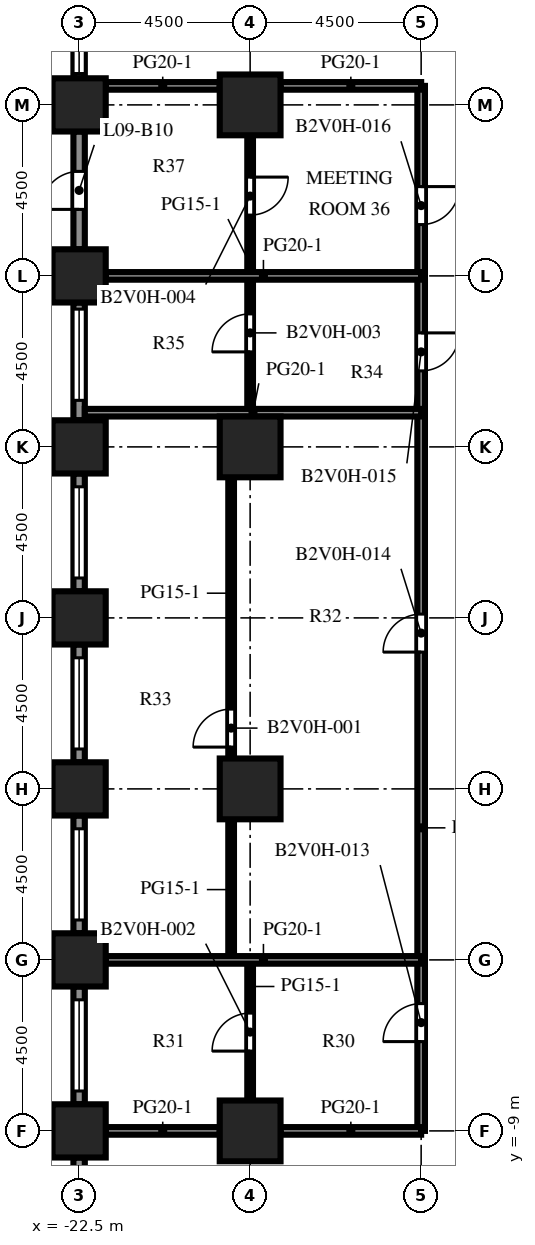
"""IFC4 building model, lengths in metres.
Left out: names, types, materials, properties, quantities, classifications, styles, units other than length and angle.
Written with IfcOpenShell. Run it as: python <this file> out.ifc"""

import sys

from ifc_helpers import new_model, si_unit, direction, frame, frame_2d, origin, origin_2d, place, context, subcontext, project, spatial, rectangle, extrude, element, fill, save


model = new_model("IFC4")
c1 = context("Model", 3, precision=1e-05, world=origin(), true_north=direction((0.0, 1.0)))
c2 = subcontext(c1, "Body", "Model", "MODEL_VIEW")
j1 = project(units=[si_unit("LENGTHUNIT", "METRE"), si_unit("PLANEANGLEUNIT", "RADIAN")], contexts=[c1])
p1 = place(None, origin())
s1 = spatial("IfcSite", under=j1, at=p1, CompositionType="ELEMENT")
p2 = place(p1, origin())
s2 = spatial("IfcBuilding", under=s1, at=p2, CompositionType="ELEMENT")
p3 = place(p2, frame((0.0, 0.0, 41.9)))
s3 = spatial("IfcBuildingStorey", under=s2, at=p3, CompositionType="ELEMENT", Elevation=41.9)
for number, where, z_axis, x_axis in (
    (1, (-22.5, -9.0, -0.45), (0.0, 0.0, 1.0), (1.0, 0.0, 0.0)),
    (2, (-22.5, -4.5, -0.45), (0.0, 0.0, 1.0), (1.0, 0.0, 0.0)),
    (3, (-22.5, 0.0, -0.45), (0.0, 0.0, 1.0), (1.0, 0.0, 0.0)),
    (4, (-22.5, 4.5, -0.45), (0.0, 0.0, 1.0), (1.0, 0.0, 0.0)),
    (5, (-22.5, 9.0, -0.45), (0.0, 0.0, 1.0), (1.0, 0.0, 0.0)),
    (6, (-22.5, 13.5, -0.45), (0.0, 0.0, 1.0), (1.0, 0.0, 0.0)),
    (7, (-22.5, 18.0, -0.45), (0.0, 0.0, 1.0), (1.0, 0.0, 0.0)),
):
    element("IfcColumn", number, at=place(p3, frame(where, z_axis=z_axis, x_axis=x_axis)), inside=s3, PredefinedType="COLUMN", context=c2, shape_type="SweptSolid", body=[
        extrude(rectangle(XDim=1.4, YDim=1.4, at=origin_2d()), origin(), (0.0, 0.0, 1.0), 4.55),
    ])
for number, where, z_axis, x_axis in (
    (8, (-18.0, -9.0, -0.45), (0.0, 0.0, 1.0), (1.0, 0.0, 0.0)),
    (9, (-18.0, 0.0, -0.45), (0.0, 0.0, 1.0), (1.0, 0.0, 0.0)),
    (10, (-18.0, 9.0, -0.45), (0.0, 0.0, 1.0), (1.0, 0.0, 0.0)),
    (11, (-18.0, 18.0, -0.45), (0.0, 0.0, 1.0), (1.0, 0.0, 0.0)),
):
    element("IfcColumn", number, at=place(p3, frame(where, z_axis=z_axis, x_axis=x_axis)), inside=s3, PredefinedType="COLUMN", context=c2, shape_type="SweptSolid", body=[
        extrude(rectangle(XDim=1.6, YDim=1.6, at=origin_2d()), origin(), (0.0, 0.0, 1.0), 4.55),
    ])
p4 = place(p3, frame((-22.5, 18.7, 0.0), z_axis=(0.0, 0.0, 1.0), x_axis=(0.0, 1.0, 0.0)))
e12 = element("IfcWall", 12, at=p4, inside=s3, PredefinedType="SOLIDWALL", context=c2, shape_type="SweptSolid", body=[
    extrude(rectangle(XDim=3.1, YDim=0.3, at=frame_2d((1.55, 0.0))), origin(), (0.0, 0.0, 1.0), 2.75),
])
p5 = place(p4, frame((0.125, 0.0, 0.8)))
e13 = element("IfcOpeningElement", 13, at=p5, cuts=e12, PredefinedType="OPENING", context=c2, shape_type="SweptSolid", body=[
    extrude(rectangle(XDim=2.4, YDim=1.7, at=frame_2d((1.2, 0.85))), frame((0.0, 0.16, 0.0), z_axis=(0.0, -1.0, 0.0), x_axis=(1.0, 0.0, 0.0)), (0.0, 0.0, 1.0), 0.32),
])
p6 = place(p3, frame((-22.5, 14.2, 0.0), z_axis=(0.0, 0.0, 1.0), x_axis=(0.0, 1.0, 0.0)))
e14 = element("IfcWall", 14, at=p6, inside=s3, PredefinedType="SOLIDWALL", context=c2, shape_type="SweptSolid", body=[
    extrude(rectangle(XDim=3.1, YDim=0.3, at=frame_2d((1.55, 0.0))), origin(), (0.0, 0.0, 1.0), 2.75),
])
p7 = place(p6, frame((1.05, 0.0, 0.0)))
e15 = element("IfcOpeningElement", 15, at=p7, cuts=e14, PredefinedType="OPENING", context=c2, shape_type="SweptSolid", body=[
    extrude(rectangle(XDim=1.0, YDim=2.2, at=frame_2d((0.5, 1.1))), frame((0.0, 0.16, 0.0), z_axis=(0.0, -1.0, 0.0), x_axis=(1.0, 0.0, 0.0)), (0.0, 0.0, 1.0), 0.32),
])
p8 = place(p3, frame((-22.5, 9.7, 0.0), z_axis=(0.0, 0.0, 1.0), x_axis=(0.0, 1.0, 0.0)))
e16 = element("IfcWall", 16, at=p8, inside=s3, PredefinedType="SOLIDWALL", context=c2, shape_type="SweptSolid", body=[
    extrude(rectangle(XDim=3.1, YDim=0.3, at=frame_2d((1.55, 0.0))), origin(), (0.0, 0.0, 1.0), 2.75),
])
p9 = place(p8, frame((0.525, 0.0, 0.8)))
e17 = element("IfcOpeningElement", 17, at=p9, cuts=e16, PredefinedType="OPENING", context=c2, shape_type="SweptSolid", body=[
    extrude(rectangle(XDim=2.4, YDim=1.7, at=frame_2d((1.2, 0.85))), frame((0.0, 0.16, 0.0), z_axis=(0.0, -1.0, 0.0), x_axis=(1.0, 0.0, 0.0)), (0.0, 0.0, 1.0), 0.32),
])
p10 = place(p3, frame((-22.5, 5.2, 0.0), z_axis=(0.0, 0.0, 1.0), x_axis=(0.0, 1.0, 0.0)))
e18 = element("IfcWall", 18, at=p10, inside=s3, PredefinedType="SOLIDWALL", context=c2, shape_type="SweptSolid", body=[
    extrude(rectangle(XDim=3.1, YDim=0.3, at=frame_2d((1.55, 0.0))), origin(), (0.0, 0.0, 1.0), 2.75),
])
p11 = place(p10, frame((0.35, 0.0, 0.8)))
e19 = element("IfcOpeningElement", 19, at=p11, cuts=e18, PredefinedType="OPENING", context=c2, shape_type="SweptSolid", body=[
    extrude(rectangle(XDim=2.4, YDim=1.7, at=frame_2d((1.2, 0.85))), frame((0.0, 0.16, 0.0), z_axis=(0.0, -1.0, 0.0), x_axis=(1.0, 0.0, 0.0)), (0.0, 0.0, 1.0), 0.32),
])
p12 = place(p3, frame((-22.5, 0.7, 0.0), z_axis=(0.0, 0.0, 1.0), x_axis=(0.0, 1.0, 0.0)))
e20 = element("IfcWall", 20, at=p12, inside=s3, PredefinedType="SOLIDWALL", context=c2, shape_type="SweptSolid", body=[
    extrude(rectangle(XDim=3.1, YDim=0.3, at=frame_2d((1.55, 0.0))), origin(), (0.0, 0.0, 1.0), 2.75),
])
p13 = place(p12, frame((0.35, 0.0, 0.8)))
e21 = element("IfcOpeningElement", 21, at=p13, cuts=e20, PredefinedType="OPENING", context=c2, shape_type="SweptSolid", body=[
    extrude(rectangle(XDim=2.4, YDim=1.7, at=frame_2d((1.2, 0.85))), frame((0.0, 0.16, 0.0), z_axis=(0.0, -1.0, 0.0), x_axis=(1.0, 0.0, 0.0)), (0.0, 0.0, 1.0), 0.32),
])
p14 = place(p3, frame((-22.5, -3.8, 0.0), z_axis=(0.0, 0.0, 1.0), x_axis=(0.0, 1.0, 0.0)))
e22 = element("IfcWall", 22, at=p14, inside=s3, PredefinedType="SOLIDWALL", context=c2, shape_type="SweptSolid", body=[
    extrude(rectangle(XDim=3.1, YDim=0.3, at=frame_2d((1.55, 0.0))), origin(), (0.0, 0.0, 1.0), 2.75),
])
p15 = place(p14, frame((0.35, 0.0, 0.8)))
e23 = element("IfcOpeningElement", 23, at=p15, cuts=e22, PredefinedType="OPENING", context=c2, shape_type="SweptSolid", body=[
    extrude(rectangle(XDim=2.4, YDim=1.7, at=frame_2d((1.2, 0.85))), frame((0.0, 0.16, 0.0), z_axis=(0.0, -1.0, 0.0), x_axis=(1.0, 0.0, 0.0)), (0.0, 0.0, 1.0), 0.32),
])
p16 = place(p3, frame((-22.5, -8.3, 0.0), z_axis=(0.0, 0.0, 1.0), x_axis=(0.0, 1.0, 0.0)))
e24 = element("IfcWall", 24, at=p16, inside=s3, PredefinedType="SOLIDWALL", context=c2, shape_type="SweptSolid", body=[
    extrude(rectangle(XDim=3.1, YDim=0.3, at=frame_2d((1.55, 0.0))), origin(), (0.0, 0.0, 1.0), 2.75),
])
p17 = place(p16, frame((0.35, 0.0, 0.8)))
e25 = element("IfcOpeningElement", 25, at=p17, cuts=e24, PredefinedType="OPENING", context=c2, shape_type="SweptSolid", body=[
    extrude(rectangle(XDim=2.4, YDim=1.7, at=frame_2d((1.2, 0.85))), frame((0.0, 0.16, 0.0), z_axis=(0.0, -1.0, 0.0), x_axis=(1.0, 0.0, 0.0)), (0.0, 0.0, 1.0), 0.32),
])
p18 = place(p3, frame((-22.5, -12.8, 0.0), z_axis=(0.0, 0.0, 1.0), x_axis=(0.0, 1.0, 0.0)))
e26 = element("IfcWall", 26, at=p18, inside=s3, PredefinedType="SOLIDWALL", context=c2, shape_type="SweptSolid", body=[
    extrude(rectangle(XDim=3.1, YDim=0.3, at=frame_2d((1.55, 0.0))), origin(), (0.0, 0.0, 1.0), 2.75),
])
p19 = place(p18, frame((1.425, 0.0, 0.8)))
e27 = element("IfcOpeningElement", 27, at=p19, cuts=e26, PredefinedType="OPENING", context=c2, shape_type="SweptSolid", body=[
    extrude(rectangle(XDim=1.2, YDim=1.7, at=frame_2d((0.6, 0.85))), frame((0.0, 0.16, 0.0), z_axis=(0.0, -1.0, 0.0), x_axis=(1.0, 0.0, 0.0)), (0.0, 0.0, 1.0), 0.32),
])
p20 = place(p3, frame((-18.5, -4.5, 0.0), z_axis=(0.0, 0.0, 1.0), x_axis=(0.0, 1.0, 0.0)))
e28 = element("IfcWall", 28, at=p20, inside=s3, PredefinedType="PARTITIONING", context=c2, shape_type="SweptSolid", body=[
    extrude(rectangle(XDim=3.7, YDim=0.15, at=frame_2d((1.85, 0.0))), origin(), (0.0, 0.0, 1.0), 3.65),
])
p21 = place(p3, frame((-18.5, 0.8, 0.0), z_axis=(0.0, 0.0, 1.0), x_axis=(0.0, 1.0, 0.0)))
e29 = element("IfcWall", 29, at=p21, inside=s3, PredefinedType="PARTITIONING", context=c2, shape_type="SweptSolid", body=[
    extrude(rectangle(XDim=7.4, YDim=0.15, at=frame_2d((3.7, 0.0))), origin(), (0.0, 0.0, 1.0), 3.65),
])
p22 = place(p21, frame((0.3, 0.0, 0.0)))
e30 = element("IfcOpeningElement", 30, at=p22, cuts=e29, PredefinedType="OPENING", context=c2, shape_type="SweptSolid", body=[
    extrude(rectangle(XDim=1.0, YDim=2.1, at=frame_2d((0.5, 1.05))), frame((0.0, 0.085, 0.0), z_axis=(0.0, -1.0, 0.0), x_axis=(1.0, 0.0, 0.0)), (0.0, 0.0, 1.0), 0.17),
])
p23 = place(p3, frame((-18.0, -8.2, 0.0), z_axis=(0.0, 0.0, 1.0), x_axis=(0.0, 1.0, 0.0)))
e31 = element("IfcWall", 31, at=p23, inside=s3, PredefinedType="PARTITIONING", context=c2, shape_type="SweptSolid", body=[
    extrude(rectangle(XDim=3.7, YDim=0.15, at=frame_2d((1.85, 0.0))), origin(), (0.0, 0.0, 1.0), 3.65),
])
p24 = place(p23, frame((1.3, 0.0, 0.0)))
e32 = element("IfcOpeningElement", 32, at=p24, cuts=e31, PredefinedType="OPENING", context=c2, shape_type="SweptSolid", body=[
    extrude(rectangle(XDim=1.0, YDim=2.1, at=frame_2d((0.5, 1.05))), frame((0.0, 0.085, 0.0), z_axis=(0.0, -1.0, 0.0), x_axis=(1.0, 0.0, 0.0)), (0.0, 0.0, 1.0), 0.17),
])
p25 = place(p3, frame((-18.0, 9.9, 0.0), z_axis=(0.0, 0.0, 1.0), x_axis=(0.0, 1.0, 0.0)))
e33 = element("IfcWall", 33, at=p25, inside=s3, PredefinedType="PARTITIONING", context=c2, shape_type="SweptSolid", body=[
    extrude(rectangle(XDim=7.3, YDim=0.15, at=frame_2d((3.65, 0.0))), origin(), (0.0, 0.0, 1.0), 3.65),
])
p26 = place(p25, frame((1.6, 0.0, 0.0)))
e34 = element("IfcOpeningElement", 34, at=p26, cuts=e33, PredefinedType="OPENING", context=c2, shape_type="SweptSolid", body=[
    extrude(rectangle(XDim=1.0, YDim=2.1, at=frame_2d((0.5, 1.05))), frame((0.0, 0.085, 0.0), z_axis=(0.0, -1.0, 0.0), x_axis=(1.0, 0.0, 0.0)), (0.0, 0.0, 1.0), 0.17),
])
p27 = place(p25, frame((5.2, 0.0, 0.0)))
e35 = element("IfcOpeningElement", 35, at=p27, cuts=e33, PredefinedType="OPENING", context=c2, shape_type="SweptSolid", body=[
    extrude(rectangle(XDim=1.0, YDim=2.1, at=frame_2d((0.5, 1.05))), frame((0.0, 0.085, 0.0), z_axis=(0.0, -1.0, 0.0), x_axis=(1.0, 0.0, 0.0)), (0.0, 0.0, 1.0), 0.17),
])
p28 = place(p3, frame((-13.5, -9.0, 0.0), z_axis=(0.0, 0.0, 1.0), x_axis=(0.0, 1.0, 0.0)))
e36 = element("IfcWall", 36, at=p28, inside=s3, PredefinedType="PARTITIONING", context=c2, shape_type="SweptSolid", body=[
    extrude(rectangle(XDim=27.5, YDim=0.2, at=frame_2d((13.75, 0.0))), origin(), (0.0, 0.0, 1.0), 3.65),
])
p29 = place(p28, frame((2.35, 0.0, 0.0)))
e37 = element("IfcOpeningElement", 37, at=p29, cuts=e36, PredefinedType="OPENING", context=c2, shape_type="SweptSolid", body=[
    extrude(rectangle(XDim=1.0, YDim=2.1, at=frame_2d((0.5, 1.05))), frame((0.0, 0.11, 0.0), z_axis=(0.0, -1.0, 0.0), x_axis=(1.0, 0.0, 0.0)), (0.0, 0.0, 1.0), 0.22),
])
p30 = place(p28, frame((12.6, 0.0, 0.0)))
e38 = element("IfcOpeningElement", 38, at=p30, cuts=e36, PredefinedType="OPENING", context=c2, shape_type="SweptSolid", body=[
    extrude(rectangle(XDim=1.0, YDim=2.1, at=frame_2d((0.5, 1.05))), frame((0.0, 0.11, 0.0), z_axis=(0.0, -1.0, 0.0), x_axis=(1.0, 0.0, 0.0)), (0.0, 0.0, 1.0), 0.22),
])
p31 = place(p28, frame((20.0, 0.0, 0.0)))
e39 = element("IfcOpeningElement", 39, at=p31, cuts=e36, PredefinedType="OPENING", context=c2, shape_type="SweptSolid", body=[
    extrude(rectangle(XDim=1.0, YDim=2.1, at=frame_2d((0.5, 1.05))), frame((0.0, 0.11, 0.0), z_axis=(0.0, -1.0, 0.0), x_axis=(1.0, 0.0, 0.0)), (0.0, 0.0, 1.0), 0.22),
])
p32 = place(p28, frame((23.85, 0.0, 0.0)))
e40 = element("IfcOpeningElement", 40, at=p32, cuts=e36, PredefinedType="OPENING", context=c2, shape_type="SweptSolid", body=[
    extrude(rectangle(XDim=1.0, YDim=2.1, at=frame_2d((0.5, 1.05))), frame((0.0, 0.11, 0.0), z_axis=(0.0, -1.0, 0.0), x_axis=(1.0, 0.0, 0.0)), (0.0, 0.0, 1.0), 0.22),
])
p33 = place(p3, frame((-21.8, -9.0, 0.0), z_axis=(0.0, 0.0, 1.0), x_axis=(1.0, 0.0, 0.0)))
e41 = element("IfcWall", 41, at=p33, inside=s3, PredefinedType="PARTITIONING", context=c2, shape_type="SweptSolid", body=[
    extrude(rectangle(XDim=3.0, YDim=0.2, at=frame_2d((1.5, 0.0))), origin(), (0.0, 0.0, 1.0), 3.65),
])
p34 = place(p3, frame((-17.2, -9.0, 0.0), z_axis=(0.0, 0.0, 1.0), x_axis=(1.0, 0.0, 0.0)))
e42 = element("IfcWall", 42, at=p34, inside=s3, PredefinedType="PARTITIONING", context=c2, shape_type="SweptSolid", body=[
    extrude(rectangle(XDim=3.7, YDim=0.2, at=frame_2d((1.85, 0.0))), origin(), (0.0, 0.0, 1.0), 3.65),
])
p35 = place(p3, frame((-21.8, -4.5, 0.0), z_axis=(0.0, 0.0, 1.0), x_axis=(1.0, 0.0, 0.0)))
e43 = element("IfcWall", 43, at=p35, inside=s3, PredefinedType="PARTITIONING", context=c2, shape_type="SweptSolid", body=[
    extrude(rectangle(XDim=8.3, YDim=0.2, at=frame_2d((4.15, 0.0))), origin(), (0.0, 0.0, 1.0), 3.65),
])
p36 = place(p3, frame((-22.35, 9.9, 0.0), z_axis=(0.0, 0.0, 1.0), x_axis=(1.0, 0.0, 0.0)))
e44 = element("IfcWall", 44, at=p36, inside=s3, PredefinedType="PARTITIONING", context=c2, shape_type="SweptSolid", body=[
    extrude(rectangle(XDim=8.85, YDim=0.2, at=frame_2d((4.425, 0.0))), origin(), (0.0, 0.0, 1.0), 3.65),
])
p37 = place(p3, frame((-21.8, 13.5, 0.0), z_axis=(0.0, 0.0, 1.0), x_axis=(1.0, 0.0, 0.0)))
e45 = element("IfcWall", 45, at=p37, inside=s3, PredefinedType="PARTITIONING", context=c2, shape_type="SweptSolid", body=[
    extrude(rectangle(XDim=8.3, YDim=0.2, at=frame_2d((4.15, 0.0))), origin(), (0.0, 0.0, 1.0), 3.65),
])
p38 = place(p3, frame((-21.8, 18.5, 0.0), z_axis=(0.0, 0.0, 1.0), x_axis=(1.0, 0.0, 0.0)))
e46 = element("IfcWall", 46, at=p38, inside=s3, PredefinedType="PARTITIONING", context=c2, shape_type="SweptSolid", body=[
    extrude(rectangle(XDim=3.0, YDim=0.2, at=frame_2d((1.5, 0.0))), origin(), (0.0, 0.0, 1.0), 3.65),
])
p39 = place(p3, frame((-17.2, 18.5, 0.0), z_axis=(0.0, 0.0, 1.0), x_axis=(1.0, 0.0, 0.0)))
e47 = element("IfcWall", 47, at=p39, inside=s3, PredefinedType="PARTITIONING", context=c2, shape_type="SweptSolid", body=[
    extrude(rectangle(XDim=3.7, YDim=0.2, at=frame_2d((1.85, 0.0))), origin(), (0.0, 0.0, 1.0), 3.65),
])
p40 = place(p5, origin())
e48 = element("IfcWindow", 48, at=p40, inside=s3, PartitioningType="SINGLE_PANEL", PredefinedType="WINDOW", context=c2, shape_type="SweptSolid", body=[
    extrude(rectangle(XDim=2.4, YDim=1.7, at=frame_2d((1.2, 0.85))), frame((0.0, 0.03, 0.0), z_axis=(0.0, -1.0, 0.0), x_axis=(1.0, 0.0, 0.0)), (0.0, 0.0, 1.0), 0.06),
])
fill(e13, e48)
p41 = place(p7, origin())
e49 = element("IfcDoor", 49, at=p41, inside=s3, OperationType="SINGLE_SWING_LEFT", PredefinedType="DOOR", context=c2, shape_type="SweptSolid", body=[
    extrude(rectangle(XDim=1.0, YDim=2.2, at=frame_2d((0.5, 1.1))), frame((0.0, 0.025, 0.0), z_axis=(0.0, -1.0, 0.0), x_axis=(1.0, 0.0, 0.0)), (0.0, 0.0, 1.0), 0.05),
])
fill(e15, e49)
p42 = place(p9, origin())
e50 = element("IfcWindow", 50, at=p42, inside=s3, PartitioningType="SINGLE_PANEL", PredefinedType="WINDOW", context=c2, shape_type="SweptSolid", body=[
    extrude(rectangle(XDim=2.4, YDim=1.7, at=frame_2d((1.2, 0.85))), frame((0.0, 0.03, 0.0), z_axis=(0.0, -1.0, 0.0), x_axis=(1.0, 0.0, 0.0)), (0.0, 0.0, 1.0), 0.06),
])
fill(e17, e50)
p43 = place(p11, origin())
e51 = element("IfcWindow", 51, at=p43, inside=s3, PartitioningType="SINGLE_PANEL", PredefinedType="WINDOW", context=c2, shape_type="SweptSolid", body=[
    extrude(rectangle(XDim=2.4, YDim=1.7, at=frame_2d((1.2, 0.85))), frame((0.0, 0.03, 0.0), z_axis=(0.0, -1.0, 0.0), x_axis=(1.0, 0.0, 0.0)), (0.0, 0.0, 1.0), 0.06),
])
fill(e19, e51)
p44 = place(p13, origin())
e52 = element("IfcWindow", 52, at=p44, inside=s3, PartitioningType="SINGLE_PANEL", PredefinedType="WINDOW", context=c2, shape_type="SweptSolid", body=[
    extrude(rectangle(XDim=2.4, YDim=1.7, at=frame_2d((1.2, 0.85))), frame((0.0, 0.03, 0.0), z_axis=(0.0, -1.0, 0.0), x_axis=(1.0, 0.0, 0.0)), (0.0, 0.0, 1.0), 0.06),
])
fill(e21, e52)
p45 = place(p15, origin())
e53 = element("IfcWindow", 53, at=p45, inside=s3, PartitioningType="SINGLE_PANEL", PredefinedType="WINDOW", context=c2, shape_type="SweptSolid", body=[
    extrude(rectangle(XDim=2.4, YDim=1.7, at=frame_2d((1.2, 0.85))), frame((0.0, 0.03, 0.0), z_axis=(0.0, -1.0, 0.0), x_axis=(1.0, 0.0, 0.0)), (0.0, 0.0, 1.0), 0.06),
])
fill(e23, e53)
p46 = place(p17, origin())
e54 = element("IfcWindow", 54, at=p46, inside=s3, PartitioningType="SINGLE_PANEL", PredefinedType="WINDOW", context=c2, shape_type="SweptSolid", body=[
    extrude(rectangle(XDim=2.4, YDim=1.7, at=frame_2d((1.2, 0.85))), frame((0.0, 0.03, 0.0), z_axis=(0.0, -1.0, 0.0), x_axis=(1.0, 0.0, 0.0)), (0.0, 0.0, 1.0), 0.06),
])
fill(e25, e54)
p47 = place(p22, origin())
e55 = element("IfcDoor", 55, at=p47, inside=s3, OperationType="SINGLE_SWING_LEFT", PredefinedType="DOOR", context=c2, shape_type="SweptSolid", body=[
    extrude(rectangle(XDim=1.0, YDim=2.1, at=frame_2d((0.5, 1.05))), frame((0.0, 0.025, 0.0), z_axis=(0.0, -1.0, 0.0), x_axis=(1.0, 0.0, 0.0)), (0.0, 0.0, 1.0), 0.05),
])
fill(e30, e55)
p48 = place(p24, origin())
e56 = element("IfcDoor", 56, at=p48, inside=s3, OperationType="SINGLE_SWING_LEFT", PredefinedType="DOOR", context=c2, shape_type="SweptSolid", body=[
    extrude(rectangle(XDim=1.0, YDim=2.1, at=frame_2d((0.5, 1.05))), frame((0.0, 0.025, 0.0), z_axis=(0.0, -1.0, 0.0), x_axis=(1.0, 0.0, 0.0)), (0.0, 0.0, 1.0), 0.05),
])
fill(e32, e56)
p49 = place(p26, origin())
e57 = element("IfcDoor", 57, at=p49, inside=s3, OperationType="SINGLE_SWING_LEFT", PredefinedType="DOOR", context=c2, shape_type="SweptSolid", body=[
    extrude(rectangle(XDim=1.0, YDim=2.1, at=frame_2d((0.5, 1.05))), frame((0.0, 0.025, 0.0), z_axis=(0.0, -1.0, 0.0), x_axis=(1.0, 0.0, 0.0)), (0.0, 0.0, 1.0), 0.05),
])
fill(e34, e57)
p50 = place(p27, origin())
e58 = element("IfcDoor", 58, at=p50, inside=s3, OperationType="SINGLE_SWING_RIGHT", PredefinedType="DOOR", context=c2, shape_type="SweptSolid", body=[
    extrude(rectangle(XDim=1.0, YDim=2.1, at=frame_2d((0.5, 1.05))), frame((0.0, 0.025, 0.0), z_axis=(0.0, -1.0, 0.0), x_axis=(1.0, 0.0, 0.0)), (0.0, 0.0, 1.0), 0.05),
])
fill(e35, e58)
p51 = place(p29, origin())
e59 = element("IfcDoor", 59, at=p51, inside=s3, OperationType="SINGLE_SWING_LEFT", PredefinedType="DOOR", context=c2, shape_type="SweptSolid", body=[
    extrude(rectangle(XDim=1.0, YDim=2.1, at=frame_2d((0.5, 1.05))), frame((0.0, 0.025, 0.0), z_axis=(0.0, -1.0, 0.0), x_axis=(1.0, 0.0, 0.0)), (0.0, 0.0, 1.0), 0.05),
])
fill(e37, e59)
p52 = place(p30, origin())
e60 = element("IfcDoor", 60, at=p52, inside=s3, OperationType="SINGLE_SWING_LEFT", PredefinedType="DOOR", context=c2, shape_type="SweptSolid", body=[
    extrude(rectangle(XDim=1.0, YDim=2.1, at=frame_2d((0.5, 1.05))), frame((0.0, 0.025, 0.0), z_axis=(0.0, -1.0, 0.0), x_axis=(1.0, 0.0, 0.0)), (0.0, 0.0, 1.0), 0.05),
])
fill(e38, e60)
p53 = place(p31, origin())
e61 = element("IfcDoor", 61, at=p53, inside=s3, OperationType="SINGLE_SWING_RIGHT", PredefinedType="DOOR", context=c2, shape_type="SweptSolid", body=[
    extrude(rectangle(XDim=1.0, YDim=2.1, at=frame_2d((0.5, 1.05))), frame((0.0, 0.025, 0.0), z_axis=(0.0, -1.0, 0.0), x_axis=(1.0, 0.0, 0.0)), (0.0, 0.0, 1.0), 0.05),
])
fill(e39, e61)
p54 = place(p32, origin())
e62 = element("IfcDoor", 62, at=p54, inside=s3, OperationType="SINGLE_SWING_RIGHT", PredefinedType="DOOR", context=c2, shape_type="SweptSolid", body=[
    extrude(rectangle(XDim=1.0, YDim=2.1, at=frame_2d((0.5, 1.05))), frame((0.0, 0.025, 0.0), z_axis=(0.0, -1.0, 0.0), x_axis=(1.0, 0.0, 0.0)), (0.0, 0.0, 1.0), 0.05),
])
fill(e40, e62)
save(model, sys.argv[1])
